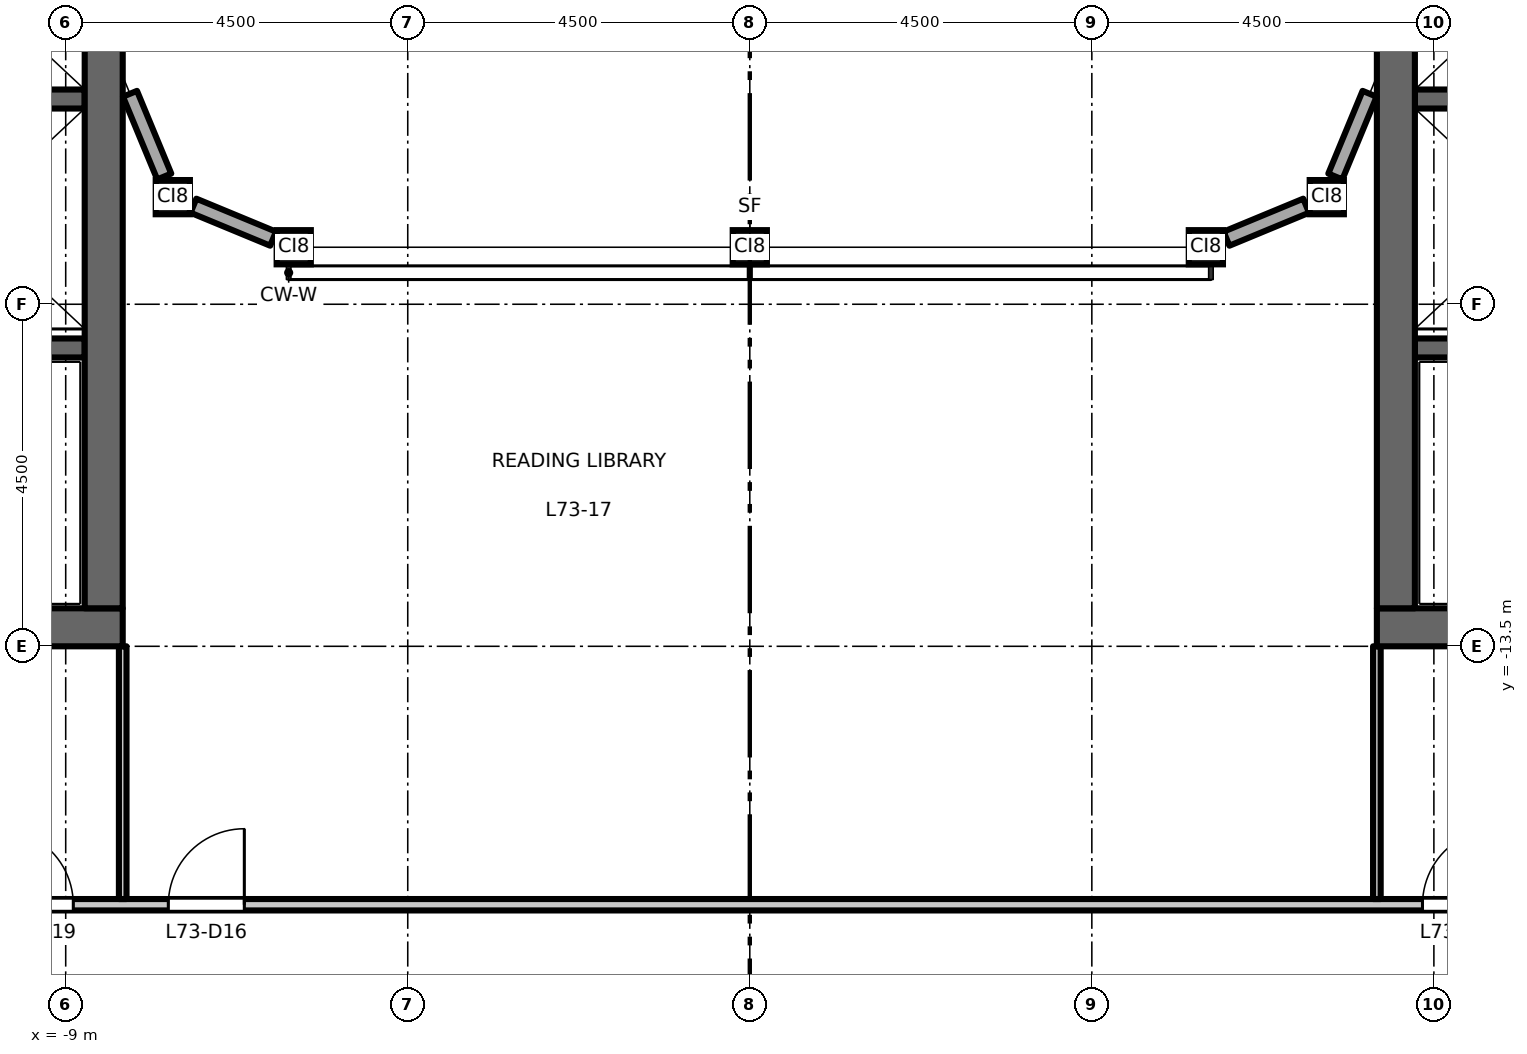
"""IFC4 building model, lengths in metres.
Left out: names, types, materials, properties, quantities, classifications, styles, units other than length and angle.
Written with IfcOpenShell. Run it as: python <this file> out.ifc"""

import sys

from ifc_helpers import new_model, si_unit, direction, frame, frame_2d, origin, origin_2d, place, context, subcontext, project, spatial, rectangle, hollow_rectangle, extrude, element, fill, save


model = new_model("IFC4")
c1 = context("Model", 3, precision=1e-05, world=origin(), true_north=direction((0.0, 1.0)))
c2 = subcontext(c1, "Body", "Model", "MODEL_VIEW")
j1 = project(units=[si_unit("LENGTHUNIT", "METRE"), si_unit("PLANEANGLEUNIT", "RADIAN")], contexts=[c1])
p1 = place(None, origin())
s1 = spatial("IfcSite", under=j1, at=p1, CompositionType="ELEMENT")
p2 = place(p1, origin())
s2 = spatial("IfcBuilding", under=s1, at=p2, CompositionType="ELEMENT")
p3 = place(p2, frame((0.0, 0.0, 339.2)))
s3 = spatial("IfcBuildingStorey", under=s2, at=p3, CompositionType="ELEMENT", Elevation=339.2)
for number, where, z_axis, x_axis in (
    (1, (-7.591, -7.591, 0.0), (0.0, 0.0, 1.0), (1.0, 0.0, 0.0)),
    (2, (-6.0, -8.25, 0.0), (0.0, 0.0, 1.0), (1.0, 0.0, 0.0)),
    (3, (0.0, -8.25, 0.0), (0.0, 0.0, 1.0), (1.0, 0.0, 0.0)),
    (4, (6.0, -8.25, 0.0), (0.0, 0.0, 1.0), (1.0, 0.0, 0.0)),
    (5, (7.591, -7.591, 0.0), (0.0, 0.0, 1.0), (1.0, 0.0, 0.0)),
):
    element("IfcColumn", number, at=place(p3, frame(where, z_axis=z_axis, x_axis=x_axis)), inside=s3, PredefinedType="COLUMN", context=c2, shape_type="SweptSolid", body=[
        extrude(hollow_rectangle(XDim=0.45, YDim=0.45, WallThickness=0.022, at=origin_2d()), origin(), (0.0, 0.0, 1.0), 4.5),
    ])
p4 = place(p3, frame((-8.75, -6.3, 0.0), z_axis=(0.0, 0.0, 1.0), x_axis=(-1.0, 0.0, 0.0)))
e6 = element("IfcWall", 6, at=p4, inside=s3, PredefinedType="SHEAR", context=c2, shape_type="SweptSolid", body=[
    extrude(rectangle(XDim=3.1, YDim=0.25, at=frame_2d((1.55, 0.0))), origin(), (0.0, 0.0, 1.0), 4.35),
])
p5 = place(p3, frame((-8.75, -9.575, 0.0), z_axis=(0.0, 0.0, 1.0), x_axis=(-1.0, 0.0, 0.0)))
e7 = element("IfcWall", 7, at=p5, inside=s3, PredefinedType="SHEAR", context=c2, shape_type="SweptSolid", body=[
    extrude(rectangle(XDim=8.0, YDim=0.25, at=frame_2d((4.0, 0.0))), origin(), (0.0, 0.0, 1.0), 4.35),
])
p6 = place(p5, frame((6.65, 0.0, 0.0)))
e8 = element("IfcOpeningElement", 8, at=p6, cuts=e7, PredefinedType="OPENING", context=c2, shape_type="SweptSolid", body=[
    extrude(rectangle(XDim=1.1, YDim=2.1, at=frame_2d((0.55, 1.05))), frame((0.0, 0.135, 0.0), z_axis=(0.0, -1.0, 0.0), x_axis=(1.0, 0.0, 0.0)), (0.0, 0.0, 1.0), 0.27),
])
p7 = place(p3, frame((-8.25, -13.25, 0.0), z_axis=(0.0, 0.0, 1.0), x_axis=(-1.0, 0.0, 0.0)))
e9 = element("IfcWall", 9, at=p7, inside=s3, PredefinedType="SHEAR", context=c2, shape_type="SweptSolid", body=[
    extrude(rectangle(XDim=9.0, YDim=0.5, at=frame_2d((4.5, 0.0))), origin(), (0.0, 0.0, 1.0), 4.35),
])
p8 = place(p3, frame((-8.5, -13.0, 0.0), z_axis=(0.0, 0.0, 1.0), x_axis=(0.0, 1.0, 0.0)))
e10 = element("IfcWall", 10, at=p8, inside=s3, PredefinedType="SHEAR", context=c2, shape_type="SweptSolid", body=[
    extrude(rectangle(XDim=26.0, YDim=0.5, at=frame_2d((13.0, 0.0))), origin(), (0.0, 0.0, 1.0), 4.35),
])
p9 = place(p3, frame((8.75, -6.3, 0.0), z_axis=(0.0, 0.0, 1.0), x_axis=(1.0, 0.0, 0.0)))
e11 = element("IfcWall", 11, at=p9, inside=s3, PredefinedType="SHEAR", context=c2, shape_type="SweptSolid", body=[
    extrude(rectangle(XDim=3.1, YDim=0.25, at=frame_2d((1.55, 0.0))), origin(), (0.0, 0.0, 1.0), 4.35),
])
p10 = place(p3, frame((8.75, -9.575, 0.0), z_axis=(0.0, 0.0, 1.0), x_axis=(1.0, 0.0, 0.0)))
e12 = element("IfcWall", 12, at=p10, inside=s3, PredefinedType="SHEAR", context=c2, shape_type="SweptSolid", body=[
    extrude(rectangle(XDim=8.0, YDim=0.25, at=frame_2d((4.0, 0.0))), origin(), (0.0, 0.0, 1.0), 4.35),
])
p11 = place(p10, frame((6.65, 0.0, 0.0)))
e13 = element("IfcOpeningElement", 13, at=p11, cuts=e12, PredefinedType="OPENING", context=c2, shape_type="SweptSolid", body=[
    extrude(rectangle(XDim=1.1, YDim=2.1, at=frame_2d((0.55, 1.05))), frame((0.0, 0.135, 0.0), z_axis=(0.0, -1.0, 0.0), x_axis=(1.0, 0.0, 0.0)), (0.0, 0.0, 1.0), 0.27),
])
p12 = place(p3, frame((8.25, -13.25, 0.0), z_axis=(0.0, 0.0, 1.0), x_axis=(1.0, 0.0, 0.0)))
e14 = element("IfcWall", 14, at=p12, inside=s3, PredefinedType="SHEAR", context=c2, shape_type="SweptSolid", body=[
    extrude(rectangle(XDim=9.0, YDim=0.5, at=frame_2d((4.5, 0.0))), origin(), (0.0, 0.0, 1.0), 4.35),
])
p13 = place(p3, frame((8.5, -13.0, 0.0), z_axis=(0.0, 0.0, 1.0), x_axis=(0.0, 1.0, 0.0)))
e15 = element("IfcWall", 15, at=p13, inside=s3, PredefinedType="SHEAR", context=c2, shape_type="SweptSolid", body=[
    extrude(rectangle(XDim=26.0, YDim=0.5, at=frame_2d((13.0, 0.0))), origin(), (0.0, 0.0, 1.0), 4.35),
])
p14 = place(p3, frame((6.271, -8.137, 0.0), z_axis=(0.0, 0.0, 1.0), x_axis=(0.923864661962, 0.382719331074, 0.0)))
e16 = element("IfcWall", 16, at=p14, inside=s3, PredefinedType="STANDARD", context=c2, shape_type="SweptSolid", body=[
    extrude(rectangle(XDim=1.134, YDim=0.2, at=frame_2d((0.567, 0.0))), origin(), (0.0, 0.0, 1.0), 4.01),
])
for number, where, z_axis, x_axis in (
    (17, (7.703, -7.319, 0.0), (0.0, 0.0, 1.0), (0.383, 0.924, 0.0)),
    (18, (-8.154, -6.231, 0.0), (0.0, 0.0, 1.0), (0.383, -0.924, 0.0)),
):
    element("IfcWall", number, at=place(p3, frame(where, z_axis=z_axis, x_axis=x_axis)), inside=s3, PredefinedType="STANDARD", context=c2, shape_type="SweptSolid", body=[
        extrude(rectangle(XDim=1.178, YDim=0.2, at=frame_2d((0.589, 0.0))), origin(), (0.0, 0.0, 1.0), 4.01),
    ])
p15 = place(p3, frame((-7.319, -7.703, 0.0), z_axis=(0.0, 0.0, 1.0), x_axis=(0.923864661962, -0.382719331074, 0.0)))
e19 = element("IfcWall", 19, at=p15, inside=s3, PredefinedType="STANDARD", context=c2, shape_type="SweptSolid", body=[
    extrude(rectangle(XDim=1.134, YDim=0.2, at=frame_2d((0.567, 0.0))), origin(), (0.0, 0.0, 1.0), 4.01),
])
p16 = place(p3, frame((-17.325, -16.9, 0.0), z_axis=(0.0, 0.0, 1.0), x_axis=(1.0, 0.0, 0.0)))
e20 = element("IfcWall", 20, at=p16, inside=s3, PredefinedType="PARTITIONING", context=c2, shape_type="SweptSolid", body=[
    extrude(rectangle(XDim=34.65, YDim=0.15, at=frame_2d((17.325, 0.0))), origin(), (0.0, 0.0, 1.0), 4.35),
])
p17 = place(p16, frame((9.675, 0.0, 0.0)))
e21 = element("IfcOpeningElement", 21, at=p17, cuts=e20, PredefinedType="OPENING", context=c2, shape_type="SweptSolid", body=[
    extrude(rectangle(XDim=1.0, YDim=2.1, at=frame_2d((0.5, 1.05))), frame((0.0, 0.085, 0.0), z_axis=(0.0, -1.0, 0.0), x_axis=(1.0, 0.0, 0.0)), (0.0, 0.0, 1.0), 0.17),
])
p18 = place(p16, frame((7.425, 0.0, 0.0)))
e22 = element("IfcOpeningElement", 22, at=p18, cuts=e20, PredefinedType="OPENING", context=c2, shape_type="SweptSolid", body=[
    extrude(rectangle(XDim=1.0, YDim=2.1, at=frame_2d((0.5, 1.05))), frame((0.0, 0.085, 0.0), z_axis=(0.0, -1.0, 0.0), x_axis=(1.0, 0.0, 0.0)), (0.0, 0.0, 1.0), 0.17),
])
p19 = place(p16, frame((26.175, 0.0, 0.0)))
e23 = element("IfcOpeningElement", 23, at=p19, cuts=e20, PredefinedType="OPENING", context=c2, shape_type="SweptSolid", body=[
    extrude(rectangle(XDim=1.0, YDim=2.1, at=frame_2d((0.5, 1.05))), frame((0.0, 0.085, 0.0), z_axis=(0.0, -1.0, 0.0), x_axis=(1.0, 0.0, 0.0)), (0.0, 0.0, 1.0), 0.17),
])
for number, where, z_axis, x_axis in (
    (24, (-8.25, -16.825, 0.0), (0.0, 0.0, 1.0), (0.0, 1.0, 0.0)),
    (25, (8.25, -16.825, 0.0), (0.0, 0.0, 1.0), (0.0, 1.0, 0.0)),
):
    element("IfcWall", number, at=place(p3, frame(where, z_axis=z_axis, x_axis=x_axis)), inside=s3, PredefinedType="PARTITIONING", context=c2, shape_type="SweptSolid", body=[
        extrude(rectangle(XDim=3.325, YDim=0.1, at=frame_2d((1.663, 0.0))), origin(), (0.0, 0.0, 1.0), 4.35),
    ])
p20 = place(p17, origin())
e26 = element("IfcDoor", 26, at=p20, inside=s3, OperationType="SINGLE_SWING_RIGHT", PredefinedType="DOOR", context=c2, shape_type="SweptSolid", body=[
    extrude(rectangle(XDim=1.0, YDim=2.1, at=frame_2d((0.5, 1.05))), frame((0.0, 0.025, 0.0), z_axis=(0.0, -1.0, 0.0), x_axis=(1.0, 0.0, 0.0)), (0.0, 0.0, 1.0), 0.05),
])
fill(e21, e26)
p21 = place(p18, origin())
e27 = element("IfcDoor", 27, at=p21, inside=s3, OperationType="SINGLE_SWING_LEFT", PredefinedType="DOOR", context=c2, shape_type="SweptSolid", body=[
    extrude(rectangle(XDim=1.0, YDim=2.1, at=frame_2d((0.5, 1.05))), frame((0.0, 0.025, 0.0), z_axis=(0.0, -1.0, 0.0), x_axis=(1.0, 0.0, 0.0)), (0.0, 0.0, 1.0), 0.05),
])
fill(e22, e27)
p22 = place(p19, origin())
e28 = element("IfcDoor", 28, at=p22, inside=s3, OperationType="SINGLE_SWING_RIGHT", PredefinedType="DOOR", context=c2, shape_type="SweptSolid", body=[
    extrude(rectangle(XDim=1.0, YDim=2.1, at=frame_2d((0.5, 1.05))), frame((0.0, 0.025, 0.0), z_axis=(0.0, -1.0, 0.0), x_axis=(1.0, 0.0, 0.0)), (0.0, 0.0, 1.0), 0.05),
])
fill(e23, e28)
save(model, sys.argv[1])
